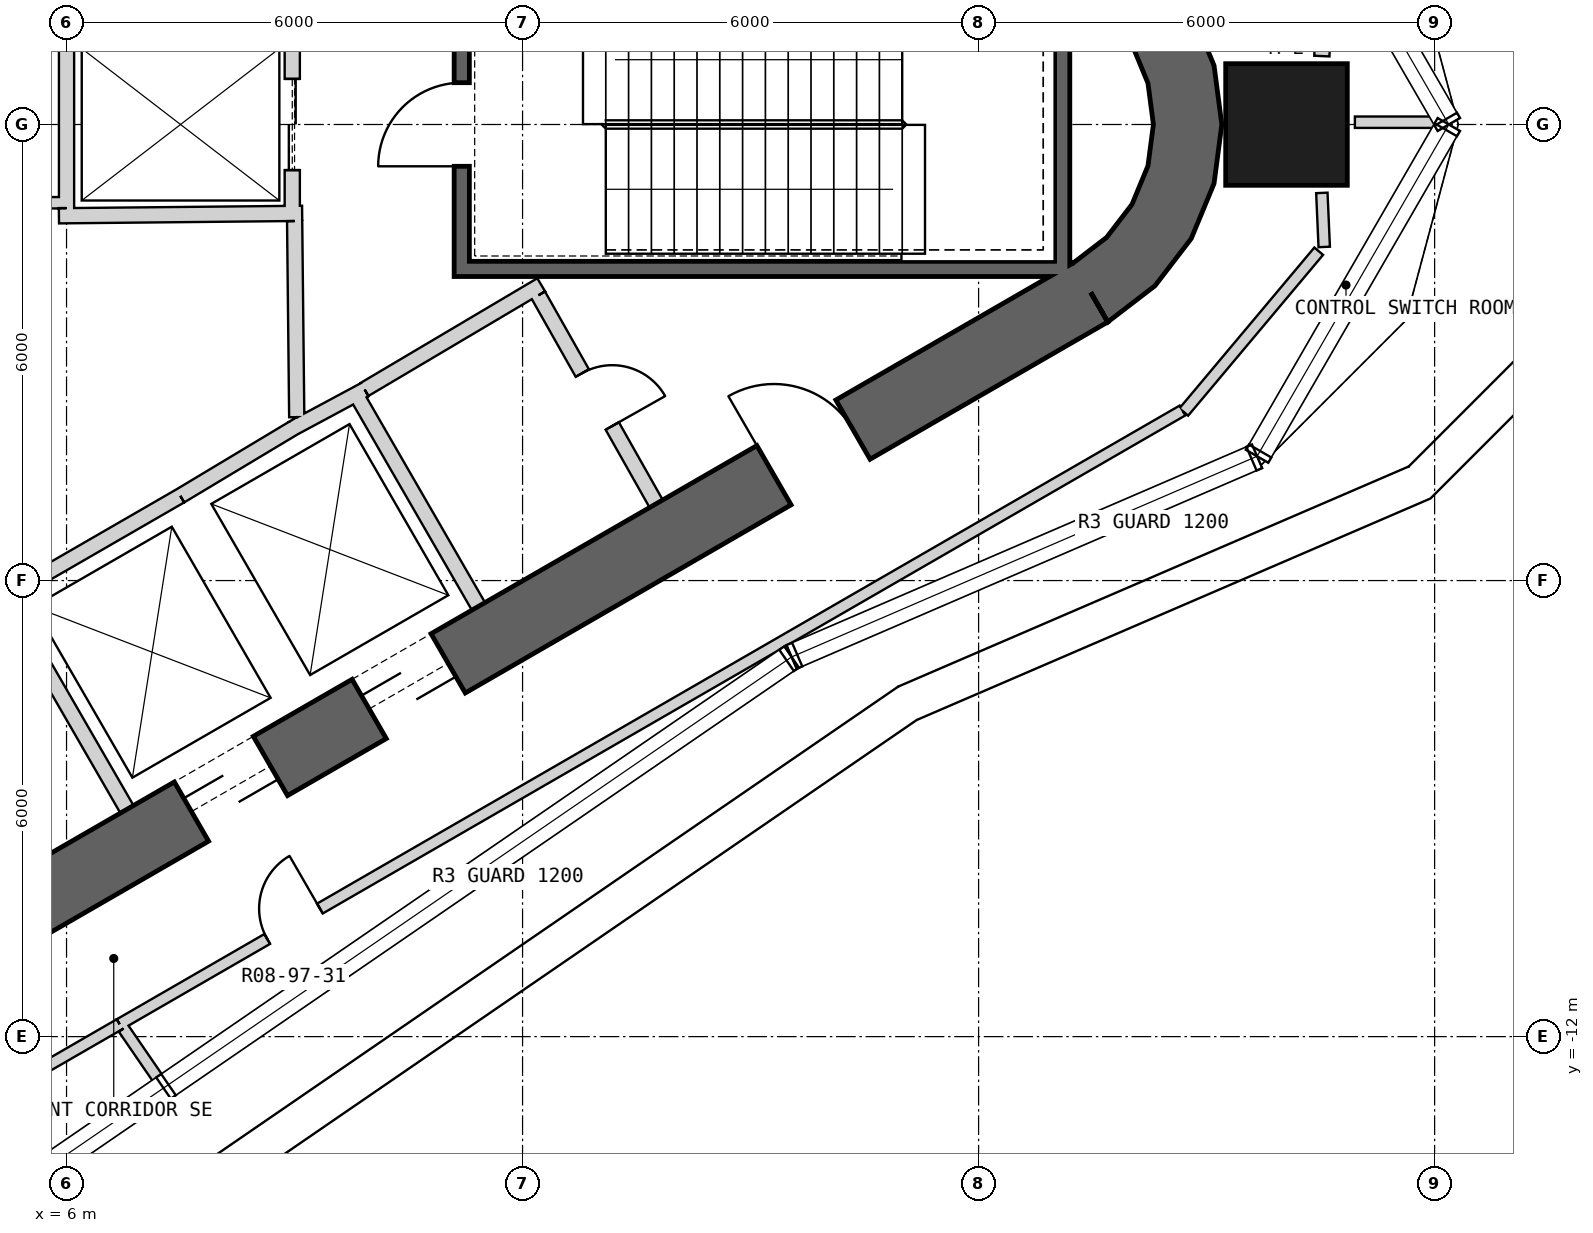
"""IFC4 building model, lengths in metres.
Left out: names, types, materials, properties, quantities, classifications, styles, units other than length and angle.
Written with IfcOpenShell. Run it as: python <this file> out.ifc"""

import sys

from ifc_helpers import new_model, si_unit, direction, frame, frame_2d, origin, origin_2d, place, context, subcontext, project, spatial, polyline, rectangle, outline, extrude, element, fill, save


model = new_model("IFC4")
c1 = context("Model", 3, precision=1e-05, world=origin(), true_north=direction((0.0, 1.0)))
c2 = subcontext(c1, "Body", "Model", "MODEL_VIEW")
j1 = project(units=[si_unit("LENGTHUNIT", "METRE"), si_unit("PLANEANGLEUNIT", "RADIAN")], contexts=[c1])
p1 = place(None, origin())
s1 = spatial("IfcSite", under=j1, at=p1, CompositionType="ELEMENT")
p2 = place(p1, origin())
s2 = spatial("IfcBuilding", under=s1, at=p2, CompositionType="ELEMENT")
p3 = place(p2, frame((0.0, 0.0, 430.3)))
s3 = spatial("IfcBuildingStorey", under=s2, at=p3, CompositionType="ELEMENT", Elevation=430.3)
p4 = place(p3, frame((22.051, 0.0, 0.0), z_axis=(0.0, 0.0, 1.0), x_axis=(1.0, 0.0, 0.0)))
e1 = element("IfcColumn", 1, at=p4, inside=s3, PredefinedType="COLUMN", context=c2, shape_type="SweptSolid", body=[
    extrude(rectangle(XDim=1.6, YDim=1.6, at=origin_2d()), origin(), (0.0, 0.0, 1.0), 5.0),
])
p5 = place(p3, frame((-7.825, -17.97, 0.0), z_axis=(0.0, 0.0, 1.0), x_axis=(0.866028369851, 0.499994862586, 0.0)))
e2 = element("IfcWall", 2, at=p5, inside=s3, PredefinedType="SHEAR", context=c2, shape_type="SweptSolid", body=[
    extrude(rectangle(XDim=31.523, YDim=0.9, at=frame_2d((15.762, 0.0))), origin(), (0.0, 0.0, 1.0), 5.0),
])
p6 = place(p5, frame((17.862, 0.0, 0.0)))
e3 = element("IfcOpeningElement", 3, at=p6, cuts=e2, PredefinedType="OPENING", context=c2, shape_type="SweptSolid", body=[
    extrude(rectangle(XDim=1.2, YDim=2.4, at=frame_2d((0.6, 1.2))), frame((0.0, 0.46, 0.0), z_axis=(0.0, -1.0, 0.0), x_axis=(1.0, 0.0, 0.0)), (0.0, 0.0, 1.0), 0.92),
])
p7 = place(p5, frame((20.562, 0.0, 0.0)))
e4 = element("IfcOpeningElement", 4, at=p7, cuts=e2, PredefinedType="OPENING", context=c2, shape_type="SweptSolid", body=[
    extrude(rectangle(XDim=1.2, YDim=2.4, at=frame_2d((0.6, 1.2))), frame((0.0, 0.46, 0.0), z_axis=(0.0, -1.0, 0.0), x_axis=(1.0, 0.0, 0.0)), (0.0, 0.0, 1.0), 0.92),
])
p8 = place(p5, frame((26.712, 0.0, 0.0)))
e5 = element("IfcOpeningElement", 5, at=p8, cuts=e2, PredefinedType="OPENING", context=c2, shape_type="SweptSolid", body=[
    extrude(rectangle(XDim=1.2, YDim=2.4, at=frame_2d((0.6, 1.2))), frame((0.0, 0.46, 0.0), z_axis=(0.0, -1.0, 0.0), x_axis=(1.0, 0.0, 0.0)), (0.0, 0.0, 1.0), 0.92),
])
p9 = place(p5, frame((3.612, 0.0, 0.0)))
e6 = element("IfcOpeningElement", 6, at=p9, cuts=e2, PredefinedType="OPENING", context=c2, shape_type="SweptSolid", body=[
    extrude(rectangle(XDim=1.2, YDim=2.4, at=frame_2d((0.6, 1.2))), frame((0.0, 0.46, 0.0), z_axis=(0.0, -1.0, 0.0), x_axis=(1.0, 0.0, 0.0)), (0.0, 0.0, 1.0), 0.92),
])
p10 = place(p3, origin())
e7 = element("IfcWall", 7, at=p10, inside=s3, PredefinedType="SHEAR", context=c2, shape_type="SweptSolid", body=[
    extrude(outline(polyline([(19.7, -2.598), (20.321, -2.121), (20.798, -1.5), (21.098, -0.777), (21.2, 0.0), (21.098, 0.777), (20.798, 1.5), (20.321, 2.121), (19.7, 2.598), (19.25, 1.819), (19.685, 1.485), (20.019, 1.05), (20.229, 0.543), (20.3, 0.0), (20.229, -0.543), (20.019, -1.05), (19.685, -1.485), (19.25, -1.819), (19.7, -2.598)])), origin(), (0.0, 0.0, 1.0), 5.0),
])
p11 = place(p3, frame((6.795, -9.01, 0.0), z_axis=(0.0, 0.0, 1.0), x_axis=(-0.499984717929, 0.866034226713, 0.0)))
e8 = element("IfcWall", 8, at=p11, inside=s3, PredefinedType="PLUMBINGWALL", context=c2, shape_type="SweptSolid", body=[
    extrude(rectangle(XDim=3.25, YDim=0.2, at=frame_2d((1.625, 0.0))), origin(), (0.0, 0.0, 1.0), 4.75),
])
p12 = place(p3, frame((5.159, -6.236, 0.0), z_axis=(0.0, 0.0, 1.0), x_axis=(0.866036505625, 0.499980770555, 0.0)))
e9 = element("IfcWall", 9, at=p12, inside=s3, PredefinedType="PLUMBINGWALL", context=c2, shape_type="SweptSolid", body=[
    extrude(rectangle(XDim=2.7, YDim=0.2, at=frame_2d((1.35, 0.0))), origin(), (0.0, 0.0, 1.0), 4.75),
])
p13 = place(p3, frame((9.795, -3.525, 0.0), z_axis=(0.0, 0.0, 1.0), x_axis=(0.499984717929, -0.866034226713, 0.0)))
e10 = element("IfcWall", 10, at=p13, inside=s3, PredefinedType="PLUMBINGWALL", context=c2, shape_type="SweptSolid", body=[
    extrude(rectangle(XDim=3.25, YDim=0.2, at=frame_2d((1.625, 0.0))), origin(), (0.0, 0.0, 1.0), 4.75),
])
p14 = place(p3, frame((8.974, -3.999, 0.0), z_axis=(0.0, 0.0, 1.0), x_axis=(0.880907015104, 0.473289373154, 0.0)))
e11 = element("IfcWall", 11, at=p14, inside=s3, PredefinedType="PLUMBINGWALL", context=c2, shape_type="SweptSolid", body=[
    extrude(rectangle(XDim=1.078, YDim=0.2, at=frame_2d((0.539, 0.0))), origin(), (0.0, 0.0, 1.0), 4.75),
])
p15 = place(p3, frame((7.497, -4.886, 0.0), z_axis=(0.0, 0.0, 1.0), x_axis=(0.857516281273, 0.51445682749, 0.0)))
e12 = element("IfcWall", 12, at=p15, inside=s3, PredefinedType="PLUMBINGWALL", context=c2, shape_type="SweptSolid", body=[
    extrude(rectangle(XDim=1.845, YDim=0.2, at=frame_2d((0.922, 0.0))), origin(), (0.0, 0.0, 1.0), 4.75),
])
p16 = place(p3, frame((19.1, -2.0, -0.25), z_axis=(0.0, 0.0, 1.0), x_axis=(0.0, 1.0, 0.0)))
e13 = element("IfcWall", 13, at=p16, inside=s3, PredefinedType="SHEAR", context=c2, shape_type="SweptSolid", body=[
    extrude(rectangle(XDim=3.8, YDim=0.2, at=frame_2d((1.9, 0.0))), origin(), (0.0, 0.0, 1.0), 5.0),
])
p17 = place(p3, frame((11.1, -1.9, -0.25), z_axis=(0.0, 0.0, 1.0), x_axis=(1.0, 0.0, 0.0)))
e14 = element("IfcWall", 14, at=p17, inside=s3, PredefinedType="SHEAR", context=c2, shape_type="SweptSolid", body=[
    extrude(rectangle(XDim=7.9, YDim=0.2, at=frame_2d((3.95, 0.0))), origin(), (0.0, 0.0, 1.0), 5.0),
])
p18 = place(p3, frame((11.2, -1.8, -0.25), z_axis=(0.0, 0.0, 1.0), x_axis=(0.0, 1.0, 0.0)))
e15 = element("IfcWall", 15, at=p18, inside=s3, PredefinedType="SHEAR", context=c2, shape_type="SweptSolid", body=[
    extrude(rectangle(XDim=3.6, YDim=0.2, at=frame_2d((1.8, 0.0))), origin(), (0.0, 0.0, 1.0), 5.0),
])
p19 = place(p18, frame((1.25, 0.0, 0.25)))
e16 = element("IfcOpeningElement", 16, at=p19, cuts=e15, PredefinedType="OPENING", context=c2, shape_type="SweptSolid", body=[
    extrude(rectangle(XDim=1.1, YDim=2.1, at=frame_2d((0.55, 1.05))), frame((0.0, 0.11, 0.0), z_axis=(0.0, -1.0, 0.0), x_axis=(1.0, 0.0, 0.0)), (0.0, 0.0, 1.0), 0.22),
])
p20 = place(p3, frame((8.97, 1.2, 0.0), z_axis=(0.0, 0.0, 1.0), x_axis=(0.0, -1.0, 0.0)))
e17 = element("IfcWall", 17, at=p20, inside=s3, PredefinedType="PLUMBINGWALL", context=c2, shape_type="SweptSolid", body=[
    extrude(rectangle(XDim=2.4, YDim=0.2, at=frame_2d((1.2, 0.0))), origin(), (0.0, 0.0, 1.0), 4.75),
])
p21 = place(p20, frame((0.6, 0.0, 0.0)))
e18 = element("IfcOpeningElement", 18, at=p21, cuts=e17, PredefinedType="OPENING", context=c2, shape_type="SweptSolid", body=[
    extrude(rectangle(XDim=1.2, YDim=2.4, at=frame_2d((0.6, 1.2))), frame((0.0, 0.11, 0.0), z_axis=(0.0, -1.0, 0.0), x_axis=(1.0, 0.0, 0.0)), (0.0, 0.0, 1.0), 0.22),
])
p22 = place(p3, frame((9.1, -1.169, 0.0), z_axis=(0.0, 0.0, 1.0), x_axis=(-0.999950064753, -0.009993397809, 0.0)))
e19 = element("IfcWall", 19, at=p22, inside=s3, PredefinedType="PLUMBINGWALL", context=c2, shape_type="SweptSolid", body=[
    extrude(rectangle(XDim=3.2, YDim=0.2, at=frame_2d((1.6, 0.0))), origin(), (0.0, 0.0, 1.0), 4.75),
])
p23 = place(p3, frame((6.0, -1.1, 0.0), z_axis=(0.0, 0.0, 1.0), x_axis=(0.0, 1.0, 0.0)))
e20 = element("IfcWall", 20, at=p23, inside=s3, PredefinedType="PLUMBINGWALL", context=c2, shape_type="SweptSolid", body=[
    extrude(rectangle(XDim=2.4, YDim=0.2, at=frame_2d((1.2, 0.0))), origin(), (0.0, 0.0, 1.0), 4.75),
])
p24 = place(p3, frame((12.245, -2.109, 0.0), z_axis=(0.0, 0.0, 1.0), x_axis=(-0.860414880418, -0.509594185166, 0.0)))
e21 = element("IfcWall", 21, at=p24, inside=s3, PredefinedType="PARTITIONING", context=c2, shape_type="SweptSolid", body=[
    extrude(rectangle(XDim=2.7, YDim=0.2, at=frame_2d((1.35, 0.0))), origin(), (0.0, 0.0, 1.0), 4.75),
])
p25 = place(p3, frame((13.758, -4.99, 0.0), z_axis=(0.0, 0.0, 1.0), x_axis=(-0.491993409184, 0.87059892334, 0.0)))
e22 = element("IfcWall", 22, at=p25, inside=s3, PredefinedType="PARTITIONING", context=c2, shape_type="SweptSolid", body=[
    extrude(rectangle(XDim=3.15, YDim=0.2, at=frame_2d((1.575, 0.0))), origin(), (0.0, 0.0, 1.0), 4.75),
])
p26 = place(p25, frame((1.175, 0.0, 0.0)))
e23 = element("IfcOpeningElement", 23, at=p26, cuts=e22, PredefinedType="OPENING", context=c2, shape_type="SweptSolid", body=[
    extrude(rectangle(XDim=0.8, YDim=2.1, at=frame_2d((0.4, 1.05))), frame((0.0, 0.11, 0.0), z_axis=(0.0, -1.0, 0.0), x_axis=(1.0, 0.0, 0.0)), (0.0, 0.0, 1.0), 0.22),
])
p27 = place(p3, frame((9.029, -3.851, 0.0), z_axis=(0.0, 0.0, 1.0), x_axis=(-0.010784614026, 0.999941844359, 0.0)))
e24 = element("IfcWall", 24, at=p27, inside=s3, PredefinedType="PARTITIONING", context=c2, shape_type="SweptSolid", body=[
    extrude(rectangle(XDim=2.581, YDim=0.2, at=frame_2d((1.291, 0.0))), origin(), (0.0, 0.0, 1.0), 4.75),
])
p28 = place(p3, frame((5.9, -1.03, 0.0), z_axis=(0.0, 0.0, 1.0), x_axis=(-1.0, 0.0, 0.0)))
e25 = element("IfcWall", 25, at=p28, inside=s3, PredefinedType="PLUMBINGWALL", context=c2, shape_type="SweptSolid", body=[
    extrude(rectangle(XDim=0.4, YDim=0.15, at=frame_2d((0.2, 0.0))), origin(), (0.0, 0.0, 1.0), 4.75),
])
p29 = place(p3, frame((22.516, 0.9, 0.0), z_axis=(0.0, 0.0, 1.0), x_axis=(0.044289222506, 0.99901875096, 0.0)))
e26 = element("IfcWall", 26, at=p29, inside=s3, PredefinedType="PARTITIONING", context=c2, shape_type="SweptSolid", body=[
    extrude(rectangle(XDim=0.535, YDim=0.2, at=frame_2d((0.267, 0.0))), origin(), (0.0, 0.0, 1.0), 4.75),
])
p30 = place(p3, frame((22.951, 0.03, 0.0), z_axis=(0.0, 0.0, 1.0), x_axis=(1.0, 0.0, 0.0)))
e27 = element("IfcWall", 27, at=p30, inside=s3, PredefinedType="PLUMBINGWALL", context=c2, shape_type="SweptSolid", body=[
    extrude(rectangle(XDim=1.098, YDim=0.15, at=frame_2d((0.549, 0.0))), origin(), (0.0, 0.0, 1.0), 3.93),
])
p31 = place(p3, frame((-7.213, -19.868, 0.0), z_axis=(0.0, 0.0, 1.0), x_axis=(0.866028156973, 0.499995231308, 0.0)))
e28 = element("IfcWall", 28, at=p31, inside=s3, PredefinedType="PLUMBINGWALL", context=c2, shape_type="SweptSolid", body=[
    extrude(rectangle(XDim=16.063, YDim=0.15, at=frame_2d((8.032, 0.0))), origin(), (0.0, 0.0, 1.0), 4.75),
])
p32 = place(p31, frame((7.675, 0.0, 0.0)))
e29 = element("IfcOpeningElement", 29, at=p32, cuts=e28, PredefinedType="OPENING", context=c2, shape_type="SweptSolid", body=[
    extrude(rectangle(XDim=0.8, YDim=2.1, at=frame_2d((0.4, 1.05))), frame((0.0, 0.085, 0.0), z_axis=(0.0, -1.0, 0.0), x_axis=(1.0, 0.0, 0.0)), (0.0, 0.0, 1.0), 0.17),
])
p33 = place(p3, frame((6.698, -11.837, 0.0), z_axis=(0.0, 0.0, 1.0), x_axis=(0.866022938386, 0.500004270171, 0.0)))
e30 = element("IfcWall", 30, at=p33, inside=s3, PredefinedType="PLUMBINGWALL", context=c2, shape_type="SweptSolid", body=[
    extrude(rectangle(XDim=16.148, YDim=0.15, at=frame_2d((8.074, 0.0))), origin(), (0.0, 0.0, 1.0), 4.75),
])
p34 = place(p33, frame((2.243, 0.0, 0.0)))
e31 = element("IfcOpeningElement", 31, at=p34, cuts=e30, PredefinedType="OPENING", context=c2, shape_type="SweptSolid", body=[
    extrude(rectangle(XDim=0.8, YDim=2.1, at=frame_2d((0.4, 1.05))), frame((0.0, 0.085, 0.0), z_axis=(0.0, -1.0, 0.0), x_axis=(1.0, 0.0, 0.0)), (0.0, 0.0, 1.0), 0.17),
])
p35 = place(p3, frame((22.548, -1.611, 0.0), z_axis=(0.0, 0.0, 1.0), x_axis=(-0.044240884026, 0.999020892765, 0.0)))
e32 = element("IfcWall", 32, at=p35, inside=s3, PredefinedType="PLUMBINGWALL", context=c2, shape_type="SweptSolid", body=[
    extrude(rectangle(XDim=0.712, YDim=0.15, at=frame_2d((0.356, 0.0))), origin(), (0.0, 0.0, 1.0), 4.75),
])
p36 = place(p3, frame((20.699, -3.783, 0.0), z_axis=(0.0, 0.0, 1.0), x_axis=(0.642806418139, 0.76602866056, 0.0)))
e33 = element("IfcWall", 33, at=p36, inside=s3, PredefinedType="PLUMBINGWALL", context=c2, shape_type="SweptSolid", body=[
    extrude(rectangle(XDim=2.762, YDim=0.15, at=frame_2d((1.381, 0.0))), origin(), (0.0, 0.0, 1.0), 4.75),
])
p37 = place(p3, frame((7.213, -12.568, 0.0), z_axis=(0.0, 0.0, 1.0), x_axis=(-0.565933909506, 0.824450611056, 0.0)))
e34 = element("IfcWall", 34, at=p37, inside=s3, PredefinedType="PLUMBINGWALL", context=c2, shape_type="SweptSolid", body=[
    extrude(rectangle(XDim=0.819, YDim=0.15, at=frame_2d((0.409, 0.0))), origin(), (0.0, 0.0, 1.0), 4.75),
])
p38 = place(p19, origin())
e35 = element("IfcDoor", 35, at=p38, inside=s3, OperationType="SINGLE_SWING_LEFT", PredefinedType="USERDEFINED", context=c2, shape_type="SweptSolid", body=[
    extrude(rectangle(XDim=1.1, YDim=2.1, at=frame_2d((0.55, 1.05))), frame((0.0, 0.025, 0.0), z_axis=(0.0, -1.0, 0.0), x_axis=(1.0, 0.0, 0.0)), (0.0, 0.0, 1.0), 0.05),
])
fill(e16, e35)
p39 = place(p21, origin())
e36 = element("IfcDoor", 36, at=p39, inside=s3, OperationType="SLIDING_TO_LEFT", PredefinedType="USERDEFINED", context=c2, shape_type="SweptSolid", body=[
    extrude(rectangle(XDim=1.2, YDim=2.4, at=frame_2d((0.6, 1.2))), frame((0.0, 0.025, 0.0), z_axis=(0.0, -1.0, 0.0), x_axis=(1.0, 0.0, 0.0)), (0.0, 0.0, 1.0), 0.05),
])
fill(e18, e36)
p40 = place(p26, origin())
e37 = element("IfcDoor", 37, at=p40, inside=s3, OperationType="SINGLE_SWING_LEFT", PredefinedType="USERDEFINED", context=c2, shape_type="SweptSolid", body=[
    extrude(rectangle(XDim=0.8, YDim=2.1, at=frame_2d((0.4, 1.05))), frame((0.0, 0.025, 0.0), z_axis=(0.0, -1.0, 0.0), x_axis=(1.0, 0.0, 0.0)), (0.0, 0.0, 1.0), 0.05),
])
fill(e23, e37)
p41 = place(p34, origin())
e38 = element("IfcDoor", 38, at=p41, inside=s3, OperationType="SINGLE_SWING_RIGHT", PredefinedType="USERDEFINED", context=c2, shape_type="SweptSolid", body=[
    extrude(rectangle(XDim=0.8, YDim=2.1, at=frame_2d((0.4, 1.05))), frame((0.0, 0.025, 0.0), z_axis=(0.0, -1.0, 0.0), x_axis=(1.0, 0.0, 0.0)), (0.0, 0.0, 1.0), 0.05),
])
fill(e31, e38)
p42 = place(p6, origin())
e39 = element("IfcDoor", 39, at=p42, inside=s3, OperationType="SLIDING_TO_LEFT", PredefinedType="USERDEFINED", context=c2, shape_type="SweptSolid", body=[
    extrude(rectangle(XDim=1.2, YDim=2.4, at=frame_2d((0.6, 1.2))), frame((0.0, 0.025, 0.0), z_axis=(0.0, -1.0, 0.0), x_axis=(1.0, 0.0, 0.0)), (0.0, 0.0, 1.0), 0.05),
])
fill(e3, e39)
p43 = place(p7, origin())
e40 = element("IfcDoor", 40, at=p43, inside=s3, OperationType="SLIDING_TO_LEFT", PredefinedType="USERDEFINED", context=c2, shape_type="SweptSolid", body=[
    extrude(rectangle(XDim=1.2, YDim=2.4, at=frame_2d((0.6, 1.2))), frame((0.0, 0.025, 0.0), z_axis=(0.0, -1.0, 0.0), x_axis=(1.0, 0.0, 0.0)), (0.0, 0.0, 1.0), 0.05),
])
fill(e4, e40)
p44 = place(p8, origin())
e41 = element("IfcDoor", 41, at=p44, inside=s3, OperationType="SINGLE_SWING_LEFT", PredefinedType="USERDEFINED", context=c2, shape_type="SweptSolid", body=[
    extrude(rectangle(XDim=1.2, YDim=2.4, at=frame_2d((0.6, 1.2))), frame((0.0, 0.025, 0.0), z_axis=(0.0, -1.0, 0.0), x_axis=(1.0, 0.0, 0.0)), (0.0, 0.0, 1.0), 0.05),
])
fill(e5, e41)
save(model, sys.argv[1])
